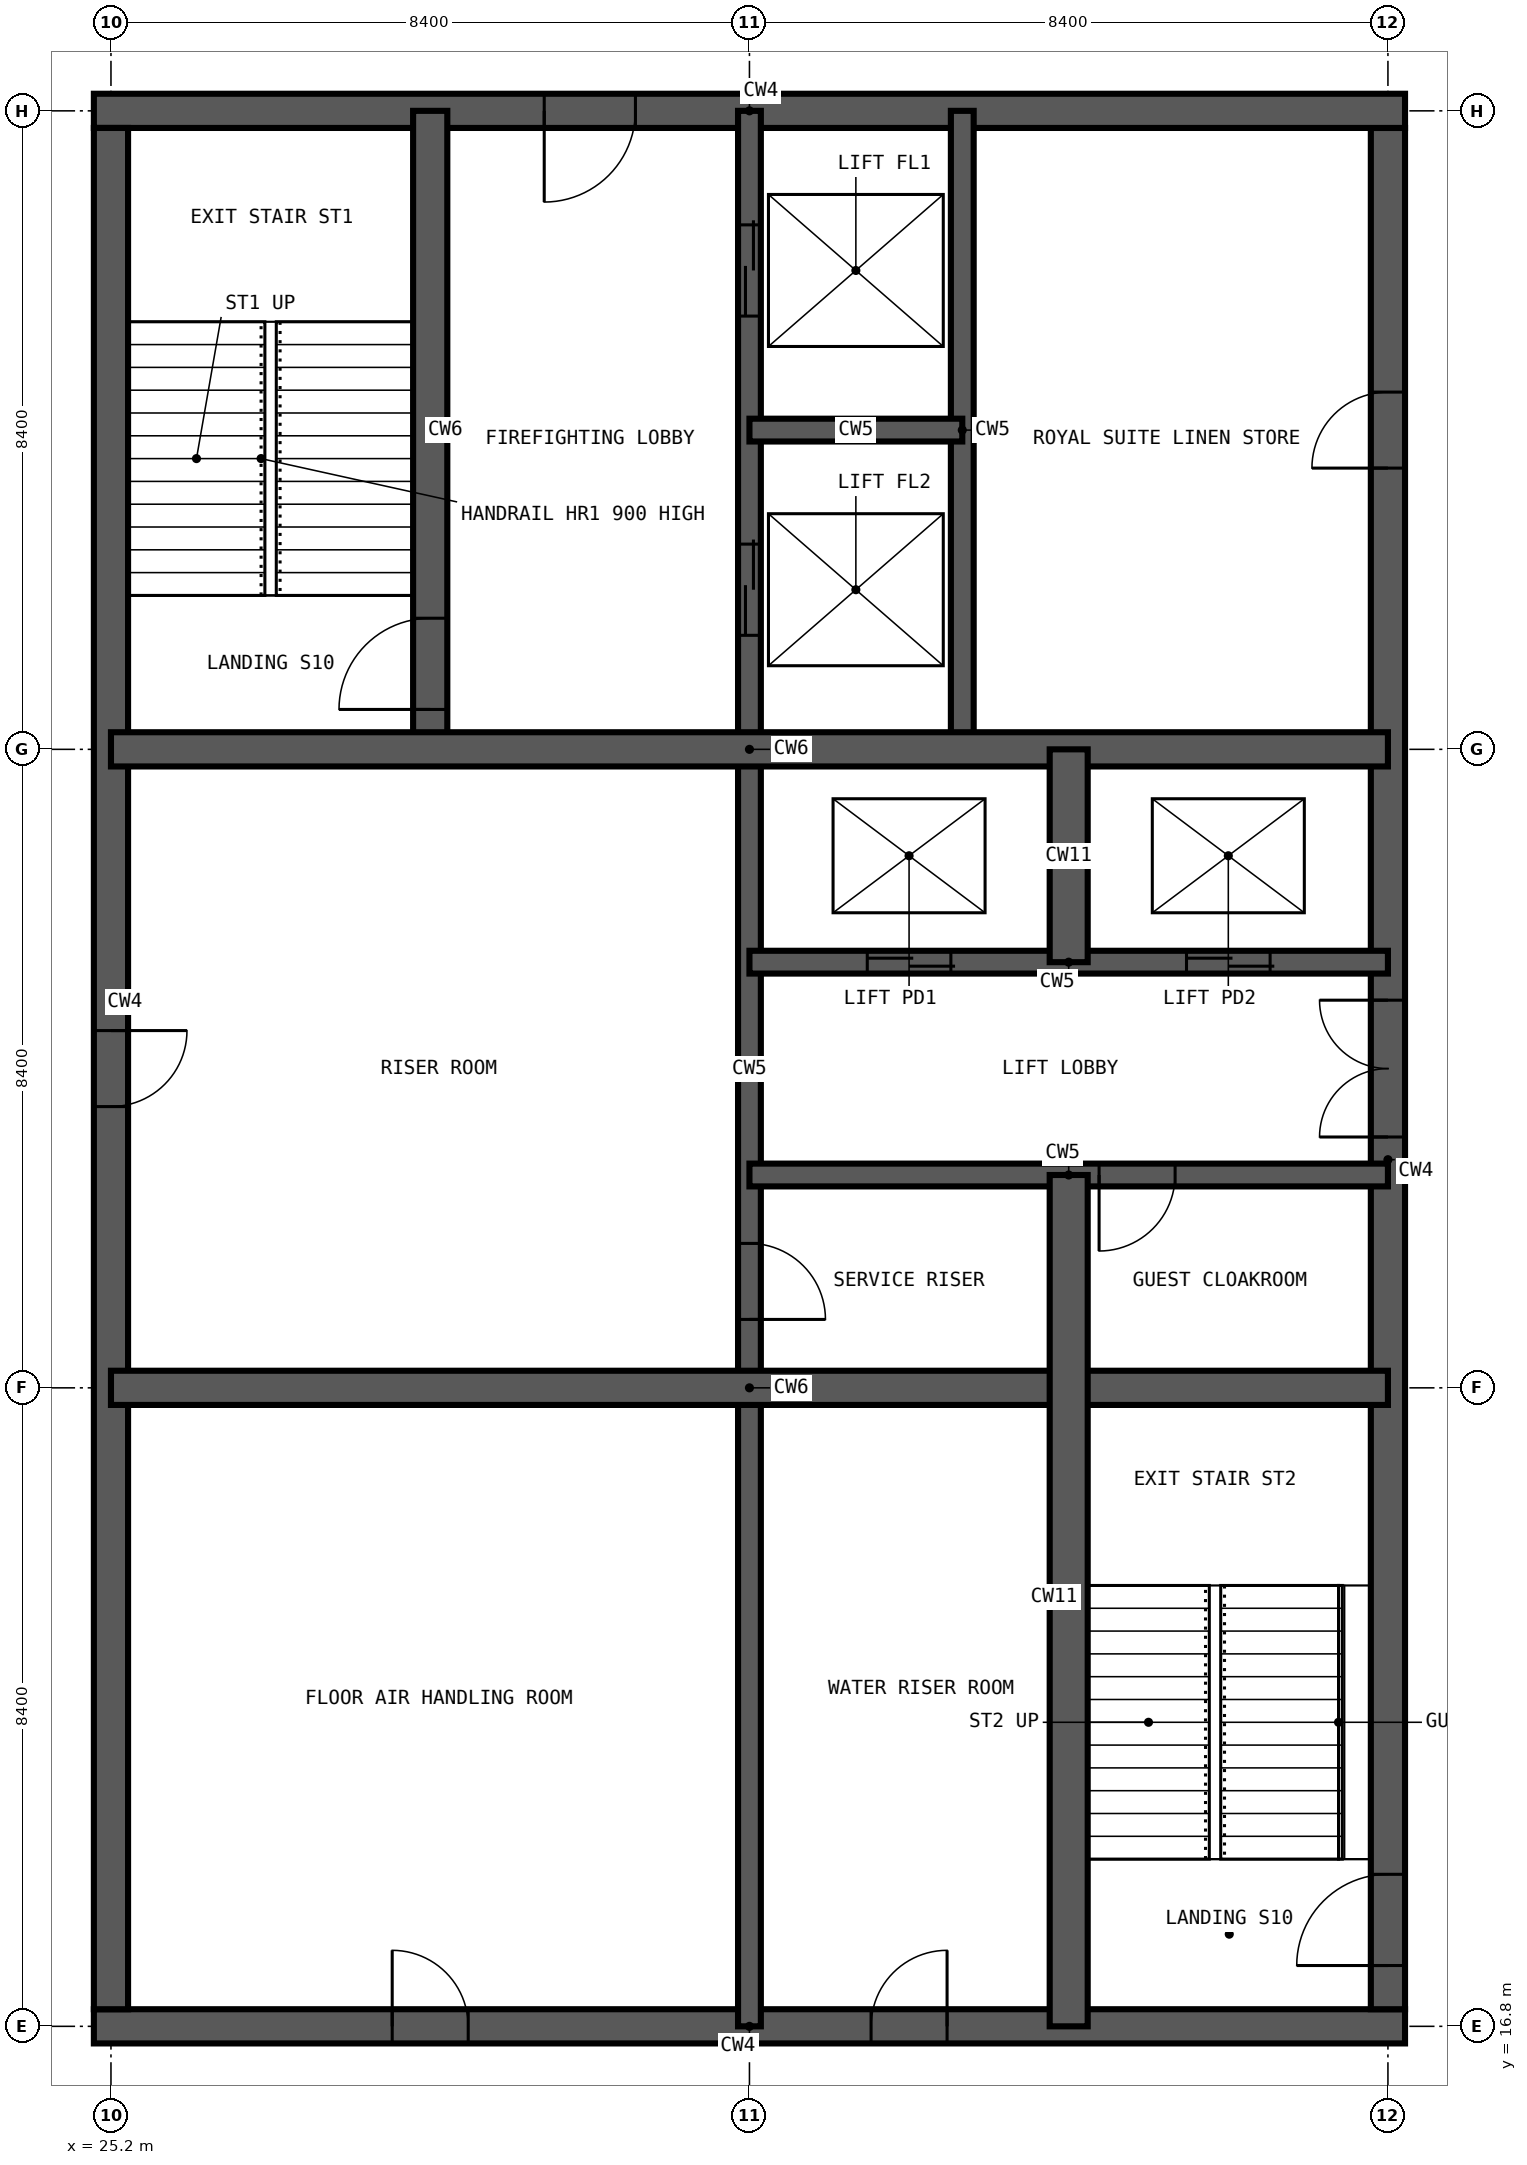
"""IFC4 building model, lengths in metres.
Left out: names, types, materials, properties, quantities, classifications, styles, units other than length and angle.
Written with IfcOpenShell. Run it as: python <this file> out.ifc"""

import sys

from ifc_helpers import new_model, si_unit, direction, frame, frame_2d, origin, place, context, subcontext, project, spatial, rectangle, extrude, element, fill, save


model = new_model("IFC4")
c1 = context("Model", 3, precision=1e-05, world=origin(), true_north=direction((0.0, 1.0)))
c2 = subcontext(c1, "Body", "Model", "MODEL_VIEW")
j1 = project(units=[si_unit("LENGTHUNIT", "METRE"), si_unit("PLANEANGLEUNIT", "RADIAN")], contexts=[c1])
p1 = place(None, origin())
s1 = spatial("IfcSite", under=j1, at=p1, CompositionType="ELEMENT")
p2 = place(p1, origin())
s2 = spatial("IfcBuilding", under=s1, at=p2, CompositionType="ELEMENT")
p3 = place(p2, frame((0.0, 0.0, 289.1)))
s3 = spatial("IfcBuildingStorey", under=s2, at=p3, CompositionType="ELEMENT", Elevation=289.1)
p4 = place(p3, frame((24.975, 16.8, -0.35), z_axis=(0.0, 0.0, 1.0), x_axis=(1.0, 0.0, 0.0)))
e1 = element("IfcWall", 1, at=p4, inside=s3, PredefinedType="SHEAR", context=c2, shape_type="SweptSolid", body=[
    extrude(rectangle(XDim=17.25, YDim=0.45, at=frame_2d((8.625, 0.0))), origin(), (0.0, 0.0, 1.0), 4.5),
])
p5 = place(p4, frame((3.925, 0.0, 0.35)))
e2 = element("IfcOpeningElement", 2, at=p5, cuts=e1, PredefinedType="OPENING", context=c2, shape_type="SweptSolid", body=[
    extrude(rectangle(XDim=1.0, YDim=2.1, at=frame_2d((0.5, 1.05))), frame((0.0, 0.235, 0.0), z_axis=(0.0, -1.0, 0.0), x_axis=(1.0, 0.0, 0.0)), (0.0, 0.0, 1.0), 0.47),
])
p6 = place(p4, frame((10.225, 0.0, 0.35)))
e3 = element("IfcOpeningElement", 3, at=p6, cuts=e1, PredefinedType="OPENING", context=c2, shape_type="SweptSolid", body=[
    extrude(rectangle(XDim=1.0, YDim=2.1, at=frame_2d((0.5, 1.05))), frame((0.0, 0.235, 0.0), z_axis=(0.0, -1.0, 0.0), x_axis=(1.0, 0.0, 0.0)), (0.0, 0.0, 1.0), 0.47),
])
p7 = place(p3, frame((42.0, 17.025, -0.35), z_axis=(0.0, 0.0, 1.0), x_axis=(0.0, 1.0, 0.0)))
e4 = element("IfcWall", 4, at=p7, inside=s3, PredefinedType="SHEAR", context=c2, shape_type="SweptSolid", body=[
    extrude(rectangle(XDim=24.75, YDim=0.45, at=frame_2d((12.375, 0.0))), origin(), (0.0, 0.0, 1.0), 4.5),
])
p8 = place(p7, frame((0.575, 0.0, 0.35)))
e5 = element("IfcOpeningElement", 5, at=p8, cuts=e4, PredefinedType="OPENING", context=c2, shape_type="SweptSolid", body=[
    extrude(rectangle(XDim=1.2, YDim=2.2, at=frame_2d((0.6, 1.1))), frame((0.0, 0.235, 0.0), z_axis=(0.0, -1.0, 0.0), x_axis=(1.0, 0.0, 0.0)), (0.0, 0.0, 1.0), 0.47),
])
p9 = place(p7, frame((11.475, 0.0, 0.35)))
e6 = element("IfcOpeningElement", 6, at=p9, cuts=e4, PredefinedType="OPENING", context=c2, shape_type="SweptSolid", body=[
    extrude(rectangle(XDim=1.8, YDim=2.2, at=frame_2d((0.9, 1.1))), frame((0.0, 0.235, 0.0), z_axis=(0.0, -1.0, 0.0), x_axis=(1.0, 0.0, 0.0)), (0.0, 0.0, 1.0), 0.47),
])
p10 = place(p7, frame((20.275, 0.0, 0.35)))
e7 = element("IfcOpeningElement", 7, at=p10, cuts=e4, PredefinedType="OPENING", context=c2, shape_type="SweptSolid", body=[
    extrude(rectangle(XDim=1.0, YDim=2.1, at=frame_2d((0.5, 1.05))), frame((0.0, 0.235, 0.0), z_axis=(0.0, -1.0, 0.0), x_axis=(1.0, 0.0, 0.0)), (0.0, 0.0, 1.0), 0.47),
])
p11 = place(p3, frame((42.225, 42.0, -0.35), z_axis=(0.0, 0.0, 1.0), x_axis=(-1.0, 0.0, 0.0)))
e8 = element("IfcWall", 8, at=p11, inside=s3, PredefinedType="SHEAR", context=c2, shape_type="SweptSolid", body=[
    extrude(rectangle(XDim=17.25, YDim=0.45, at=frame_2d((8.625, 0.0))), origin(), (0.0, 0.0, 1.0), 4.5),
])
p12 = place(p11, frame((10.125, 0.0, 0.35)))
e9 = element("IfcOpeningElement", 9, at=p12, cuts=e8, PredefinedType="OPENING", context=c2, shape_type="SweptSolid", body=[
    extrude(rectangle(XDim=1.2, YDim=2.2, at=frame_2d((0.6, 1.1))), frame((0.0, 0.235, 0.0), z_axis=(0.0, -1.0, 0.0), x_axis=(1.0, 0.0, 0.0)), (0.0, 0.0, 1.0), 0.47),
])
p13 = place(p3, frame((25.2, 41.775, -0.35), z_axis=(0.0, 0.0, 1.0), x_axis=(0.0, -1.0, 0.0)))
e10 = element("IfcWall", 10, at=p13, inside=s3, PredefinedType="SHEAR", context=c2, shape_type="SweptSolid", body=[
    extrude(rectangle(XDim=24.75, YDim=0.45, at=frame_2d((12.375, 0.0))), origin(), (0.0, 0.0, 1.0), 4.5),
])
p14 = place(p13, frame((11.875, 0.0, 0.35)))
e11 = element("IfcOpeningElement", 11, at=p14, cuts=e10, PredefinedType="OPENING", context=c2, shape_type="SweptSolid", body=[
    extrude(rectangle(XDim=1.0, YDim=2.1, at=frame_2d((0.5, 1.05))), frame((0.0, 0.235, 0.0), z_axis=(0.0, -1.0, 0.0), x_axis=(1.0, 0.0, 0.0)), (0.0, 0.0, 1.0), 0.47),
])
p15 = place(p3, frame((33.6, 16.8, -0.35), z_axis=(0.0, 0.0, 1.0), x_axis=(0.0, 1.0, 0.0)))
e12 = element("IfcWall", 12, at=p15, inside=s3, PredefinedType="SHEAR", context=c2, shape_type="SweptSolid", body=[
    extrude(rectangle(XDim=25.2, YDim=0.3, at=frame_2d((12.6, 0.0))), origin(), (0.0, 0.0, 1.0), 4.5),
])
p16 = place(p15, frame((22.5, 0.0, 0.35)))
e13 = element("IfcOpeningElement", 13, at=p16, cuts=e12, PredefinedType="OPENING", context=c2, shape_type="SweptSolid", body=[
    extrude(rectangle(XDim=1.2, YDim=2.2, at=frame_2d((0.6, 1.1))), frame((0.0, 0.16, 0.0), z_axis=(0.0, -1.0, 0.0), x_axis=(1.0, 0.0, 0.0)), (0.0, 0.0, 1.0), 0.32),
])
p17 = place(p15, frame((18.3, 0.0, 0.35)))
e14 = element("IfcOpeningElement", 14, at=p17, cuts=e12, PredefinedType="OPENING", context=c2, shape_type="SweptSolid", body=[
    extrude(rectangle(XDim=1.2, YDim=2.2, at=frame_2d((0.6, 1.1))), frame((0.0, 0.16, 0.0), z_axis=(0.0, -1.0, 0.0), x_axis=(1.0, 0.0, 0.0)), (0.0, 0.0, 1.0), 0.32),
])
p18 = place(p15, frame((9.3, 0.0, 0.35)))
e15 = element("IfcOpeningElement", 15, at=p18, cuts=e12, PredefinedType="OPENING", context=c2, shape_type="SweptSolid", body=[
    extrude(rectangle(XDim=1.0, YDim=2.1, at=frame_2d((0.5, 1.05))), frame((0.0, 0.16, 0.0), z_axis=(0.0, -1.0, 0.0), x_axis=(1.0, 0.0, 0.0)), (0.0, 0.0, 1.0), 0.32),
])
p19 = place(p3, frame((36.4, 33.6, -0.35), z_axis=(0.0, 0.0, 1.0), x_axis=(0.0, 1.0, 0.0)))
e16 = element("IfcWall", 16, at=p19, inside=s3, PredefinedType="SHEAR", context=c2, shape_type="SweptSolid", body=[
    extrude(rectangle(XDim=8.4, YDim=0.3, at=frame_2d((4.2, 0.0))), origin(), (0.0, 0.0, 1.0), 4.5),
])
p20 = place(p3, frame((33.6, 28.0, -0.35), z_axis=(0.0, 0.0, 1.0), x_axis=(1.0, 0.0, 0.0)))
e17 = element("IfcWall", 17, at=p20, inside=s3, PredefinedType="SHEAR", context=c2, shape_type="SweptSolid", body=[
    extrude(rectangle(XDim=8.4, YDim=0.3, at=frame_2d((4.2, 0.0))), origin(), (0.0, 0.0, 1.0), 4.5),
])
p21 = place(p20, frame((4.6, 0.0, 0.35)))
e18 = element("IfcOpeningElement", 18, at=p21, cuts=e17, PredefinedType="OPENING", context=c2, shape_type="SweptSolid", body=[
    extrude(rectangle(XDim=1.0, YDim=2.1, at=frame_2d((0.5, 1.05))), frame((0.0, 0.16, 0.0), z_axis=(0.0, -1.0, 0.0), x_axis=(1.0, 0.0, 0.0)), (0.0, 0.0, 1.0), 0.32),
])
p22 = place(p3, frame((33.6, 30.8, -0.35), z_axis=(0.0, 0.0, 1.0), x_axis=(1.0, 0.0, 0.0)))
e19 = element("IfcWall", 19, at=p22, inside=s3, PredefinedType="SHEAR", context=c2, shape_type="SweptSolid", body=[
    extrude(rectangle(XDim=8.4, YDim=0.3, at=frame_2d((4.2, 0.0))), origin(), (0.0, 0.0, 1.0), 4.5),
])
p23 = place(p22, frame((1.55, 0.0, 0.35)))
e20 = element("IfcOpeningElement", 20, at=p23, cuts=e19, PredefinedType="OPENING", context=c2, shape_type="SweptSolid", body=[
    extrude(rectangle(XDim=1.1, YDim=2.2, at=frame_2d((0.55, 1.1))), frame((0.0, 0.16, 0.0), z_axis=(0.0, -1.0, 0.0), x_axis=(1.0, 0.0, 0.0)), (0.0, 0.0, 1.0), 0.32),
])
p24 = place(p22, frame((5.75, 0.0, 0.35)))
e21 = element("IfcOpeningElement", 21, at=p24, cuts=e19, PredefinedType="OPENING", context=c2, shape_type="SweptSolid", body=[
    extrude(rectangle(XDim=1.1, YDim=2.2, at=frame_2d((0.55, 1.1))), frame((0.0, 0.16, 0.0), z_axis=(0.0, -1.0, 0.0), x_axis=(1.0, 0.0, 0.0)), (0.0, 0.0, 1.0), 0.32),
])
p25 = place(p3, frame((33.6, 37.8, -0.35), z_axis=(0.0, 0.0, 1.0), x_axis=(1.0, 0.0, 0.0)))
e22 = element("IfcWall", 22, at=p25, inside=s3, PredefinedType="SHEAR", context=c2, shape_type="SweptSolid", body=[
    extrude(rectangle(XDim=2.8, YDim=0.3, at=frame_2d((1.4, 0.0))), origin(), (0.0, 0.0, 1.0), 4.5),
])
p26 = place(p3, frame((29.4, 33.6, -0.35), z_axis=(0.0, 0.0, 1.0), x_axis=(0.0, 1.0, 0.0)))
e23 = element("IfcWall", 23, at=p26, inside=s3, PredefinedType="SHEAR", context=c2, shape_type="SweptSolid", body=[
    extrude(rectangle(XDim=8.4, YDim=0.45, at=frame_2d((4.2, 0.0))), origin(), (0.0, 0.0, 1.0), 4.5),
])
p27 = place(p26, frame((0.525, 0.0, 0.35)))
e24 = element("IfcOpeningElement", 24, at=p27, cuts=e23, PredefinedType="OPENING", context=c2, shape_type="SweptSolid", body=[
    extrude(rectangle(XDim=1.2, YDim=2.2, at=frame_2d((0.6, 1.1))), frame((0.0, 0.235, 0.0), z_axis=(0.0, -1.0, 0.0), x_axis=(1.0, 0.0, 0.0)), (0.0, 0.0, 1.0), 0.47),
])
for number, where, z_axis, x_axis in (
    (25, (25.2, 25.2, -0.35), (0.0, 0.0, 1.0), (1.0, 0.0, 0.0)),
    (26, (25.2, 33.6, -0.35), (0.0, 0.0, 1.0), (1.0, 0.0, 0.0)),
):
    element("IfcWall", number, at=place(p3, frame(where, z_axis=z_axis, x_axis=x_axis)), inside=s3, PredefinedType="SHEAR", context=c2, shape_type="SweptSolid", body=[
        extrude(rectangle(XDim=16.8, YDim=0.45, at=frame_2d((8.4, 0.0))), origin(), (0.0, 0.0, 1.0), 4.5),
    ])
p28 = place(p3, frame((37.8, 16.8, -0.35), z_axis=(0.0, 0.0, 1.0), x_axis=(0.0, 1.0, 0.0)))
e27 = element("IfcWall", 27, at=p28, inside=s3, PredefinedType="SHEAR", context=c2, shape_type="SweptSolid", body=[
    extrude(rectangle(XDim=11.2, YDim=0.5, at=frame_2d((5.6, 0.0))), origin(), (0.0, 0.0, 1.0), 4.5),
])
p29 = place(p3, frame((37.8, 30.8, -0.35), z_axis=(0.0, 0.0, 1.0), x_axis=(0.0, 1.0, 0.0)))
e28 = element("IfcWall", 28, at=p29, inside=s3, PredefinedType="SHEAR", context=c2, shape_type="SweptSolid", body=[
    extrude(rectangle(XDim=2.8, YDim=0.5, at=frame_2d((1.4, 0.0))), origin(), (0.0, 0.0, 1.0), 4.5),
])
p30 = place(p27, origin())
e29 = element("IfcDoor", 29, at=p30, inside=s3, OperationType="SINGLE_SWING_LEFT", PredefinedType="DOOR", context=c2, shape_type="SweptSolid", body=[
    extrude(rectangle(XDim=1.2, YDim=2.2, at=frame_2d((0.6, 1.1))), frame((0.0, 0.025, 0.0), z_axis=(0.0, -1.0, 0.0), x_axis=(1.0, 0.0, 0.0)), (0.0, 0.0, 1.0), 0.05),
])
fill(e24, e29)
p31 = place(p8, origin())
e30 = element("IfcDoor", 30, at=p31, inside=s3, OperationType="SINGLE_SWING_LEFT", PredefinedType="DOOR", context=c2, shape_type="SweptSolid", body=[
    extrude(rectangle(XDim=1.2, YDim=2.2, at=frame_2d((0.6, 1.1))), frame((0.0, 0.025, 0.0), z_axis=(0.0, -1.0, 0.0), x_axis=(1.0, 0.0, 0.0)), (0.0, 0.0, 1.0), 0.05),
])
fill(e5, e30)
p32 = place(p23, origin())
e31 = element("IfcDoor", 31, at=p32, inside=s3, OperationType="DOUBLE_DOOR_SLIDING", PredefinedType="DOOR", context=c2, shape_type="SweptSolid", body=[
    extrude(rectangle(XDim=1.1, YDim=2.2, at=frame_2d((0.55, 1.1))), frame((0.0, 0.025, 0.0), z_axis=(0.0, -1.0, 0.0), x_axis=(1.0, 0.0, 0.0)), (0.0, 0.0, 1.0), 0.05),
])
fill(e20, e31)
p33 = place(p24, origin())
e32 = element("IfcDoor", 32, at=p33, inside=s3, OperationType="DOUBLE_DOOR_SLIDING", PredefinedType="DOOR", context=c2, shape_type="SweptSolid", body=[
    extrude(rectangle(XDim=1.1, YDim=2.2, at=frame_2d((0.55, 1.1))), frame((0.0, 0.025, 0.0), z_axis=(0.0, -1.0, 0.0), x_axis=(1.0, 0.0, 0.0)), (0.0, 0.0, 1.0), 0.05),
])
fill(e21, e32)
p34 = place(p16, origin())
e33 = element("IfcDoor", 33, at=p34, inside=s3, OperationType="DOUBLE_DOOR_SLIDING", PredefinedType="DOOR", context=c2, shape_type="SweptSolid", body=[
    extrude(rectangle(XDim=1.2, YDim=2.2, at=frame_2d((0.6, 1.1))), frame((0.0, 0.025, 0.0), z_axis=(0.0, -1.0, 0.0), x_axis=(1.0, 0.0, 0.0)), (0.0, 0.0, 1.0), 0.05),
])
fill(e13, e33)
p35 = place(p17, origin())
e34 = element("IfcDoor", 34, at=p35, inside=s3, OperationType="DOUBLE_DOOR_SLIDING", PredefinedType="DOOR", context=c2, shape_type="SweptSolid", body=[
    extrude(rectangle(XDim=1.2, YDim=2.2, at=frame_2d((0.6, 1.1))), frame((0.0, 0.025, 0.0), z_axis=(0.0, -1.0, 0.0), x_axis=(1.0, 0.0, 0.0)), (0.0, 0.0, 1.0), 0.05),
])
fill(e14, e34)
p36 = place(p14, origin())
e35 = element("IfcDoor", 35, at=p36, inside=s3, OperationType="SINGLE_SWING_LEFT", PredefinedType="DOOR", context=c2, shape_type="SweptSolid", body=[
    extrude(rectangle(XDim=1.0, YDim=2.1, at=frame_2d((0.5, 1.05))), frame((0.0, 0.025, 0.0), z_axis=(0.0, -1.0, 0.0), x_axis=(1.0, 0.0, 0.0)), (0.0, 0.0, 1.0), 0.05),
])
fill(e11, e35)
p37 = place(p18, frame((1.0, 0.0, 0.0), z_axis=(0.0, 0.0, 1.0), x_axis=(-1.0, 0.0, 0.0)))
e36 = element("IfcDoor", 36, at=p37, inside=s3, OperationType="SINGLE_SWING_RIGHT", PredefinedType="DOOR", context=c2, shape_type="SweptSolid", body=[
    extrude(rectangle(XDim=1.0, YDim=2.1, at=frame_2d((0.5, 1.05))), frame((0.0, 0.025, 0.0), z_axis=(0.0, -1.0, 0.0), x_axis=(1.0, 0.0, 0.0)), (0.0, 0.0, 1.0), 0.05),
])
fill(e15, e36)
p38 = place(p21, frame((1.0, 0.0, 0.0), z_axis=(0.0, 0.0, 1.0), x_axis=(-1.0, 0.0, 0.0)))
e37 = element("IfcDoor", 37, at=p38, inside=s3, OperationType="SINGLE_SWING_RIGHT", PredefinedType="DOOR", context=c2, shape_type="SweptSolid", body=[
    extrude(rectangle(XDim=1.0, YDim=2.1, at=frame_2d((0.5, 1.05))), frame((0.0, 0.025, 0.0), z_axis=(0.0, -1.0, 0.0), x_axis=(1.0, 0.0, 0.0)), (0.0, 0.0, 1.0), 0.05),
])
fill(e18, e37)
p39 = place(p9, origin())
e38 = element("IfcDoor", 38, at=p39, inside=s3, OperationType="DOUBLE_DOOR_DOUBLE_SWING", PredefinedType="DOOR", context=c2, shape_type="SweptSolid", body=[
    extrude(rectangle(XDim=1.8, YDim=2.2, at=frame_2d((0.9, 1.1))), frame((0.0, 0.025, 0.0), z_axis=(0.0, -1.0, 0.0), x_axis=(1.0, 0.0, 0.0)), (0.0, 0.0, 1.0), 0.05),
])
fill(e6, e38)
p40 = place(p12, origin())
e39 = element("IfcDoor", 39, at=p40, inside=s3, OperationType="SINGLE_SWING_RIGHT", PredefinedType="DOOR", context=c2, shape_type="SweptSolid", body=[
    extrude(rectangle(XDim=1.2, YDim=2.2, at=frame_2d((0.6, 1.1))), frame((0.0, 0.025, 0.0), z_axis=(0.0, -1.0, 0.0), x_axis=(1.0, 0.0, 0.0)), (0.0, 0.0, 1.0), 0.05),
])
fill(e9, e39)
p41 = place(p10, origin())
e40 = element("IfcDoor", 40, at=p41, inside=s3, OperationType="SINGLE_SWING_LEFT", PredefinedType="DOOR", context=c2, shape_type="SweptSolid", body=[
    extrude(rectangle(XDim=1.0, YDim=2.1, at=frame_2d((0.5, 1.05))), frame((0.0, 0.025, 0.0), z_axis=(0.0, -1.0, 0.0), x_axis=(1.0, 0.0, 0.0)), (0.0, 0.0, 1.0), 0.05),
])
fill(e7, e40)
p42 = place(p5, origin())
e41 = element("IfcDoor", 41, at=p42, inside=s3, OperationType="SINGLE_SWING_LEFT", PredefinedType="DOOR", context=c2, shape_type="SweptSolid", body=[
    extrude(rectangle(XDim=1.0, YDim=2.1, at=frame_2d((0.5, 1.05))), frame((0.0, 0.025, 0.0), z_axis=(0.0, -1.0, 0.0), x_axis=(1.0, 0.0, 0.0)), (0.0, 0.0, 1.0), 0.05),
])
fill(e2, e41)
p43 = place(p6, origin())
e42 = element("IfcDoor", 42, at=p43, inside=s3, OperationType="SINGLE_SWING_RIGHT", PredefinedType="DOOR", context=c2, shape_type="SweptSolid", body=[
    extrude(rectangle(XDim=1.0, YDim=2.1, at=frame_2d((0.5, 1.05))), frame((0.0, 0.025, 0.0), z_axis=(0.0, -1.0, 0.0), x_axis=(1.0, 0.0, 0.0)), (0.0, 0.0, 1.0), 0.05),
])
fill(e3, e42)
save(model, sys.argv[1])
